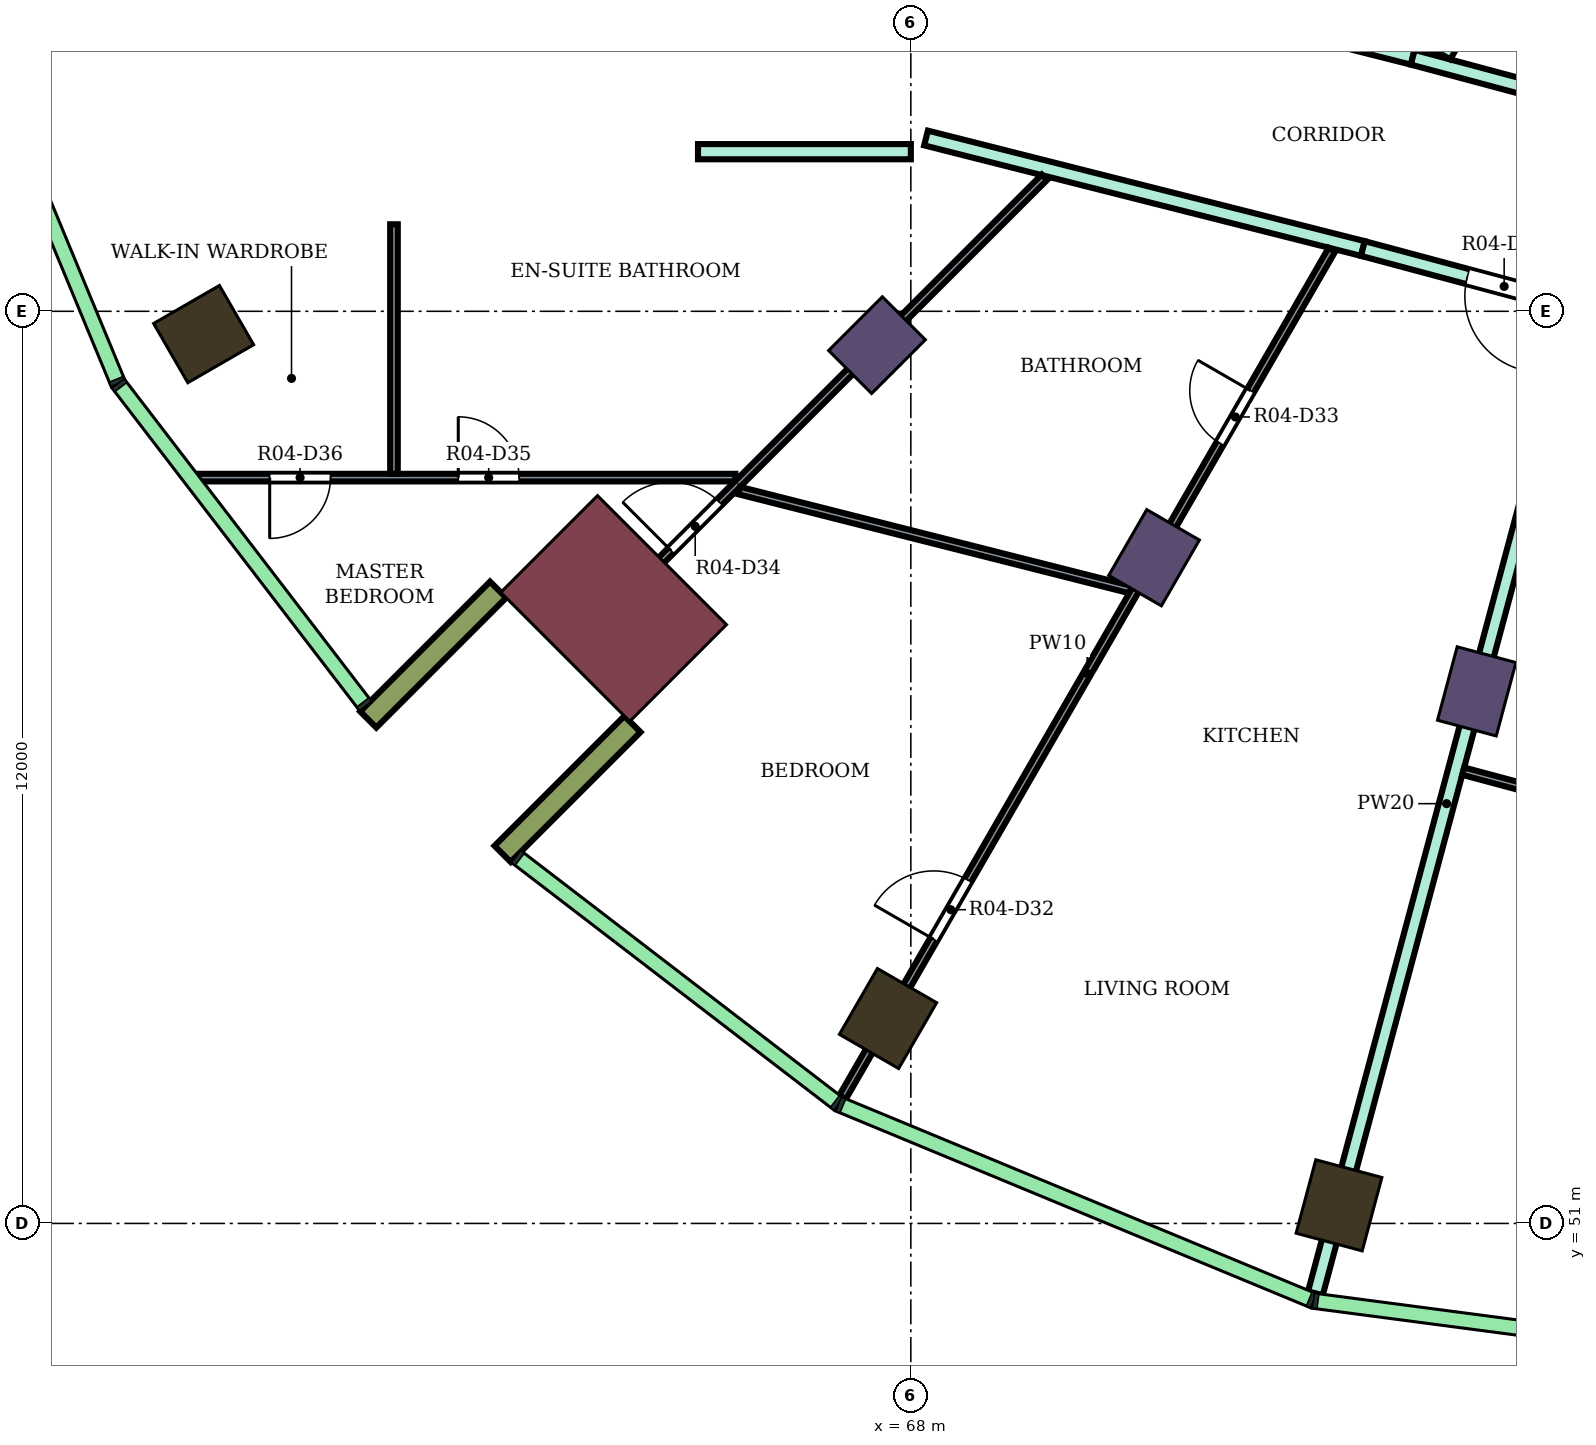
"""IFC4 building model, lengths in metres.
Left out: names, types, materials, properties, quantities, classifications, styles, units other than length and angle.
Written with IfcOpenShell. Run it as: python <this file> out.ifc"""

import sys

from ifc_helpers import new_model, si_unit, direction, frame, frame_2d, origin, origin_2d, place, context, subcontext, project, spatial, rectangle, extrude, element, fill, save


model = new_model("IFC4")
c1 = context("Model", 3, precision=1e-05, world=origin(), true_north=direction((0.0, 1.0)))
c2 = subcontext(c1, "Body", "Model", "MODEL_VIEW")
j1 = project(units=[si_unit("LENGTHUNIT", "METRE"), si_unit("PLANEANGLEUNIT", "RADIAN")], contexts=[c1])
p1 = place(None, origin())
s1 = spatial("IfcSite", under=j1, at=p1, CompositionType="ELEMENT")
p2 = place(p1, origin())
s2 = spatial("IfcBuilding", under=s1, at=p2, CompositionType="ELEMENT")
p3 = place(p2, frame((0.0, 0.0, 202.8)))
s3 = spatial("IfcBuildingStorey", under=s2, at=p3, CompositionType="ELEMENT", Elevation=202.8)
for number, where, z_axis, x_axis in (
    (1, (58.696, 62.7, 0.0), (0.0, 0.0, 1.0), (-0.866, -0.5, 0.0)),
    (2, (67.7, 53.696, 0.0), (0.0, 0.0, 1.0), (-0.5, -0.866, 0.0)),
    (3, (73.633, 51.238, 0.0), (0.0, 0.0, 1.0), (-0.259, -0.966, 0.0)),
):
    element("IfcColumn", number, at=place(p3, frame(where, z_axis=z_axis, x_axis=x_axis)), inside=s3, PredefinedType="COLUMN", context=c2, shape_type="SweptSolid", body=[
        extrude(rectangle(XDim=1.0, YDim=0.9, at=origin_2d()), origin(), (0.0, 0.0, 1.0), 4.1),
    ])
for number, where, z_axis, x_axis in (
    (4, (67.555, 62.555, 0.0), (0.0, 0.0, 1.0), (-0.707, -0.707, 0.0)),
    (5, (71.2, 59.758, 0.0), (0.0, 0.0, 1.0), (-0.5, -0.866, 0.0)),
    (6, (75.445, 58.0, 0.0), (0.0, 0.0, 1.0), (-0.259, -0.966, 0.0)),
):
    element("IfcColumn", number, at=place(p3, frame(where, z_axis=z_axis, x_axis=x_axis)), inside=s3, PredefinedType="COLUMN", context=c2, shape_type="SweptSolid", body=[
        extrude(rectangle(XDim=1.0, YDim=0.8, at=origin_2d()), origin(), (0.0, 0.0, 1.0), 4.1),
    ])
p4 = place(p3, frame((64.09, 59.09, 0.0), z_axis=(0.0, 0.0, 1.0), x_axis=(-0.707106781187, -0.707106781187, 0.0)))
e7 = element("IfcColumn", 7, at=p4, inside=s3, PredefinedType="COLUMN", context=c2, shape_type="SweptSolid", body=[
    extrude(rectangle(XDim=1.8, YDim=2.4, at=origin_2d()), origin(), (0.0, 0.0, 1.0), 4.1),
])
for number, where, z_axis, x_axis in (
    (8, (62.57, 59.338, 0.0), (0.0, 0.0, 1.0), (-0.707, -0.707, 0.0)),
    (9, (64.338, 57.57, 0.0), (0.0, 0.0, 1.0), (-0.707, -0.707, 0.0)),
):
    element("IfcWall", number, at=place(p3, frame(where, z_axis=z_axis, x_axis=x_axis)), inside=s3, PredefinedType="NOTDEFINED", context=c2, shape_type="SweptSolid", body=[
        extrude(rectangle(XDim=2.416, YDim=0.3, at=frame_2d((1.208, 0.0))), origin(), (0.0, 0.0, 1.0), 4.1),
    ])
p5 = place(p3, frame((65.2, 65.1, 0.0), z_axis=(0.0, 0.0, 1.0), x_axis=(1.0, 0.0, 0.0)))
e10 = element("IfcWall", 10, at=p5, inside=s3, PredefinedType="PARTITIONING", context=c2, shape_type="SweptSolid", body=[
    extrude(rectangle(XDim=2.8, YDim=0.2, at=frame_2d((1.4, 0.0))), origin(), (0.0, 0.0, 1.0), 3.65),
])
p6 = place(p3, frame((68.2, 65.28, 0.0), z_axis=(0.0, 0.0, 1.0), x_axis=(0.969450596516, -0.245286650503, 0.0)))
e11 = element("IfcWall", 11, at=p6, inside=s3, PredefinedType="PARTITIONING", context=c2, shape_type="SweptSolid", body=[
    extrude(rectangle(XDim=5.928, YDim=0.2, at=frame_2d((2.964, 0.0))), origin(), (0.0, 0.0, 1.0), 3.65),
])
p7 = place(p3, frame((72.1, 66.975, 0.0), z_axis=(0.0, 0.0, 1.0), x_axis=(0.969471314457, -0.245204752086, 0.0)))
e12 = element("IfcWall", 12, at=p7, inside=s3, PredefinedType="PARTITIONING", context=c2, shape_type="SweptSolid", body=[
    extrude(rectangle(XDim=2.582, YDim=0.2, at=frame_2d((1.291, 0.0))), origin(), (0.0, 0.0, 1.0), 3.65),
])
p8 = place(p7, frame((0.841, 0.0, 0.0)))
e13 = element("IfcOpeningElement", 13, at=p8, cuts=e12, PredefinedType="OPENING", context=c2, shape_type="SweptSolid", body=[
    extrude(rectangle(XDim=0.9, YDim=2.1, at=frame_2d((0.45, 1.05))), frame((0.0, 0.11, 0.0), z_axis=(0.0, -1.0, 0.0), x_axis=(1.0, 0.0, 0.0)), (0.0, 0.0, 1.0), 0.22),
])
p9 = place(p3, frame((73.323, 50.081, 0.0), z_axis=(0.0, 0.0, 1.0), x_axis=(0.258888262922, 0.965907276772, 0.0)))
e14 = element("IfcWall", 14, at=p9, inside=s3, PredefinedType="PARTITIONING", context=c2, shape_type="SweptSolid", body=[
    extrude(rectangle(XDim=13.338, YDim=0.2, at=frame_2d((6.669, 0.0))), origin(), (0.0, 0.0, 1.0), 3.65),
])
p10 = place(p3, frame((73.947, 63.826, 0.0), z_axis=(0.0, 0.0, 1.0), x_axis=(0.965908253407, -0.258884619088, 0.0)))
e15 = element("IfcWall", 15, at=p10, inside=s3, PredefinedType="PARTITIONING", context=c2, shape_type="SweptSolid", body=[
    extrude(rectangle(XDim=6.217, YDim=0.2, at=frame_2d((3.108, 0.0))), origin(), (0.0, 0.0, 1.0), 3.65),
])
p11 = place(p10, frame((1.424, 0.0, 0.0)))
e16 = element("IfcOpeningElement", 16, at=p11, cuts=e15, PredefinedType="OPENING", context=c2, shape_type="SweptSolid", body=[
    extrude(rectangle(XDim=1.0, YDim=2.1, at=frame_2d((0.5, 1.05))), frame((0.0, 0.11, 0.0), z_axis=(0.0, -1.0, 0.0), x_axis=(1.0, 0.0, 0.0)), (0.0, 0.0, 1.0), 0.22),
])
p12 = place(p3, frame((74.603, 66.342, 0.0), z_axis=(0.0, 0.0, 1.0), x_axis=(0.965920893652, -0.258837453254, 0.0)))
e17 = element("IfcWall", 17, at=p12, inside=s3, PredefinedType="PARTITIONING", context=c2, shape_type="SweptSolid", body=[
    extrude(rectangle(XDim=5.458, YDim=0.2, at=frame_2d((2.729, 0.0))), origin(), (0.0, 0.0, 1.0), 3.65),
])
p13 = place(p12, frame((2.512, 0.0, 0.0)))
e18 = element("IfcOpeningElement", 18, at=p13, cuts=e17, PredefinedType="OPENING", context=c2, shape_type="SweptSolid", body=[
    extrude(rectangle(XDim=0.9, YDim=2.1, at=frame_2d((0.45, 1.05))), frame((0.0, 0.11, 0.0), z_axis=(0.0, -1.0, 0.0), x_axis=(1.0, 0.0, 0.0)), (0.0, 0.0, 1.0), 0.22),
])
p14 = place(p3, frame((75.01, 66.364, 0.0), z_axis=(0.0, 0.0, 1.0), x_axis=(0.500097042406, 0.865969369075, 0.0)))
e19 = element("IfcWall", 19, at=p14, inside=s3, PredefinedType="PARTITIONING", context=c2, shape_type="SweptSolid", body=[
    extrude(rectangle(XDim=2.275, YDim=0.2, at=frame_2d((1.138, 0.0))), origin(), (0.0, 0.0, 1.0), 3.65),
])
p15 = place(p3, frame((58.6, 60.812, 0.0), z_axis=(0.0, 0.0, 1.0), x_axis=(1.0, 0.0, 0.0)))
e20 = element("IfcWall", 20, at=p15, inside=s3, PredefinedType="PARTITIONING", context=c2, shape_type="SweptSolid", body=[
    extrude(rectangle(XDim=7.092, YDim=0.1, at=frame_2d((3.546, 0.0))), origin(), (0.0, 0.0, 1.0), 3.65),
])
p16 = place(p15, frame((3.446, 0.0, 0.0)))
e21 = element("IfcOpeningElement", 21, at=p16, cuts=e20, PredefinedType="OPENING", context=c2, shape_type="SweptSolid", body=[
    extrude(rectangle(XDim=0.8, YDim=2.1, at=frame_2d((0.4, 1.05))), frame((0.0, 0.06, 0.0), z_axis=(0.0, -1.0, 0.0), x_axis=(1.0, 0.0, 0.0)), (0.0, 0.0, 1.0), 0.12),
])
p17 = place(p15, frame((0.965, 0.0, 0.0)))
e22 = element("IfcOpeningElement", 22, at=p17, cuts=e20, PredefinedType="OPENING", context=c2, shape_type="SweptSolid", body=[
    extrude(rectangle(XDim=0.8, YDim=2.1, at=frame_2d((0.4, 1.05))), frame((0.0, 0.06, 0.0), z_axis=(0.0, -1.0, 0.0), x_axis=(1.0, 0.0, 0.0)), (0.0, 0.0, 1.0), 0.12),
])
p18 = place(p3, frame((61.2, 60.862, 0.0), z_axis=(0.0, 0.0, 1.0), x_axis=(0.0, 1.0, 0.0)))
e23 = element("IfcWall", 23, at=p18, inside=s3, PredefinedType="PARTITIONING", context=c2, shape_type="SweptSolid", body=[
    extrude(rectangle(XDim=3.283, YDim=0.1, at=frame_2d((1.642, 0.0))), origin(), (0.0, 0.0, 1.0), 3.65),
])
p19 = place(p3, frame((63.592, 58.6, 0.0), z_axis=(0.0, 0.0, 1.0), x_axis=(0.707260766325, 0.706952762508, 0.0)))
e24 = element("IfcWall", 24, at=p19, inside=s3, PredefinedType="PARTITIONING", context=c2, shape_type="SweptSolid", body=[
    extrude(rectangle(XDim=8.719, YDim=0.1, at=frame_2d((4.36, 0.0))), origin(), (0.0, 0.0, 1.0), 3.65),
])
p20 = place(p19, frame((1.772, 0.0, 0.0)))
e25 = element("IfcOpeningElement", 25, at=p20, cuts=e24, PredefinedType="OPENING", context=c2, shape_type="SweptSolid", body=[
    extrude(rectangle(XDim=0.9, YDim=2.1, at=frame_2d((0.45, 1.05))), frame((0.0, 0.06, 0.0), z_axis=(0.0, -1.0, 0.0), x_axis=(1.0, 0.0, 0.0)), (0.0, 0.0, 1.0), 0.12),
])
p21 = place(p3, frame((65.74, 60.642, 0.0), z_axis=(0.0, 0.0, 1.0), x_axis=(0.969435742918, -0.245345349156, 0.0)))
e26 = element("IfcWall", 26, at=p21, inside=s3, PredefinedType="PARTITIONING", context=c2, shape_type="SweptSolid", body=[
    extrude(rectangle(XDim=5.314, YDim=0.1, at=frame_2d((2.657, 0.0))), origin(), (0.0, 0.0, 1.0), 3.65),
])
p22 = place(p3, frame((67.101, 52.659, 0.0), z_axis=(0.0, 0.0, 1.0), x_axis=(0.500035926033, 0.866004660886, 0.0)))
e27 = element("IfcWall", 27, at=p22, inside=s3, PredefinedType="PARTITIONING", context=c2, shape_type="SweptSolid", body=[
    extrude(rectangle(XDim=12.876, YDim=0.1, at=frame_2d((6.438, 0.0))), origin(), (0.0, 0.0, 1.0), 3.65),
])
p23 = place(p22, frame((2.401, 0.0, 0.0)))
e28 = element("IfcOpeningElement", 28, at=p23, cuts=e27, PredefinedType="OPENING", context=c2, shape_type="SweptSolid", body=[
    extrude(rectangle(XDim=0.9, YDim=2.1, at=frame_2d((0.45, 1.05))), frame((0.0, 0.06, 0.0), z_axis=(0.0, -1.0, 0.0), x_axis=(1.0, 0.0, 0.0)), (0.0, 0.0, 1.0), 0.12),
])
p24 = place(p22, frame((9.936, 0.0, 0.0)))
e29 = element("IfcOpeningElement", 29, at=p24, cuts=e27, PredefinedType="OPENING", context=c2, shape_type="SweptSolid", body=[
    extrude(rectangle(XDim=0.8, YDim=2.1, at=frame_2d((0.4, 1.05))), frame((0.0, 0.06, 0.0), z_axis=(0.0, -1.0, 0.0), x_axis=(1.0, 0.0, 0.0)), (0.0, 0.0, 1.0), 0.12),
])
p25 = place(p3, frame((75.267, 56.95, 0.0), z_axis=(0.0, 0.0, 1.0), x_axis=(0.965900084933, -0.25891509405, 0.0)))
e30 = element("IfcWall", 30, at=p25, inside=s3, PredefinedType="PARTITIONING", context=c2, shape_type="SweptSolid", body=[
    extrude(rectangle(XDim=4.84, YDim=0.1, at=frame_2d((2.42, 0.0))), origin(), (0.0, 0.0, 1.0), 3.65),
])
p26 = place(p25, frame((0.91, 0.0, 0.0)))
e31 = element("IfcOpeningElement", 31, at=p26, cuts=e30, PredefinedType="OPENING", context=c2, shape_type="SweptSolid", body=[
    extrude(rectangle(XDim=0.8, YDim=2.1, at=frame_2d((0.4, 1.05))), frame((0.0, 0.06, 0.0), z_axis=(0.0, -1.0, 0.0), x_axis=(1.0, 0.0, 0.0)), (0.0, 0.0, 1.0), 0.12),
])
p27 = place(p25, frame((3.24, 0.0, 0.0)))
e32 = element("IfcOpeningElement", 32, at=p27, cuts=e30, PredefinedType="OPENING", context=c2, shape_type="SweptSolid", body=[
    extrude(rectangle(XDim=0.8, YDim=2.1, at=frame_2d((0.4, 1.05))), frame((0.0, 0.06, 0.0), z_axis=(0.0, -1.0, 0.0), x_axis=(1.0, 0.0, 0.0)), (0.0, 0.0, 1.0), 0.12),
])
p28 = place(p11, frame((1.0, 0.0, 0.0), z_axis=(0.0, 0.0, 1.0), x_axis=(-1.0, 0.0, 0.0)))
e33 = element("IfcDoor", 33, at=p28, inside=s3, OperationType="SINGLE_SWING_LEFT", PredefinedType="DOOR", context=c2, shape_type="SweptSolid", body=[
    extrude(rectangle(XDim=1.0, YDim=2.1, at=frame_2d((0.5, 1.05))), frame((0.0, 0.025, 0.0), z_axis=(0.0, -1.0, 0.0), x_axis=(1.0, 0.0, 0.0)), (0.0, 0.0, 1.0), 0.05),
])
fill(e16, e33)
p29 = place(p23, origin())
e34 = element("IfcDoor", 34, at=p29, inside=s3, OperationType="SINGLE_SWING_LEFT", PredefinedType="DOOR", context=c2, shape_type="SweptSolid", body=[
    extrude(rectangle(XDim=0.9, YDim=2.1, at=frame_2d((0.45, 1.05))), frame((0.0, 0.025, 0.0), z_axis=(0.0, -1.0, 0.0), x_axis=(1.0, 0.0, 0.0)), (0.0, 0.0, 1.0), 0.05),
])
fill(e28, e34)
p30 = place(p24, origin())
e35 = element("IfcDoor", 35, at=p30, inside=s3, OperationType="SINGLE_SWING_RIGHT", PredefinedType="DOOR", context=c2, shape_type="SweptSolid", body=[
    extrude(rectangle(XDim=0.8, YDim=2.1, at=frame_2d((0.4, 1.05))), frame((0.0, 0.025, 0.0), z_axis=(0.0, -1.0, 0.0), x_axis=(1.0, 0.0, 0.0)), (0.0, 0.0, 1.0), 0.05),
])
fill(e29, e35)
p31 = place(p20, origin())
e36 = element("IfcDoor", 36, at=p31, inside=s3, OperationType="SINGLE_SWING_LEFT", PredefinedType="DOOR", context=c2, shape_type="SweptSolid", body=[
    extrude(rectangle(XDim=0.9, YDim=2.1, at=frame_2d((0.45, 1.05))), frame((0.0, 0.025, 0.0), z_axis=(0.0, -1.0, 0.0), x_axis=(1.0, 0.0, 0.0)), (0.0, 0.0, 1.0), 0.05),
])
fill(e25, e36)
p32 = place(p16, origin())
e37 = element("IfcDoor", 37, at=p32, inside=s3, OperationType="SINGLE_SWING_LEFT", PredefinedType="DOOR", context=c2, shape_type="SweptSolid", body=[
    extrude(rectangle(XDim=0.8, YDim=2.1, at=frame_2d((0.4, 1.05))), frame((0.0, 0.025, 0.0), z_axis=(0.0, -1.0, 0.0), x_axis=(1.0, 0.0, 0.0)), (0.0, 0.0, 1.0), 0.05),
])
fill(e21, e37)
p33 = place(p17, frame((0.8, 0.0, 0.0), z_axis=(0.0, 0.0, 1.0), x_axis=(-1.0, 0.0, 0.0)))
e38 = element("IfcDoor", 38, at=p33, inside=s3, OperationType="SINGLE_SWING_RIGHT", PredefinedType="DOOR", context=c2, shape_type="SweptSolid", body=[
    extrude(rectangle(XDim=0.8, YDim=2.1, at=frame_2d((0.4, 1.05))), frame((0.0, 0.025, 0.0), z_axis=(0.0, -1.0, 0.0), x_axis=(1.0, 0.0, 0.0)), (0.0, 0.0, 1.0), 0.05),
])
fill(e22, e38)
save(model, sys.argv[1])
